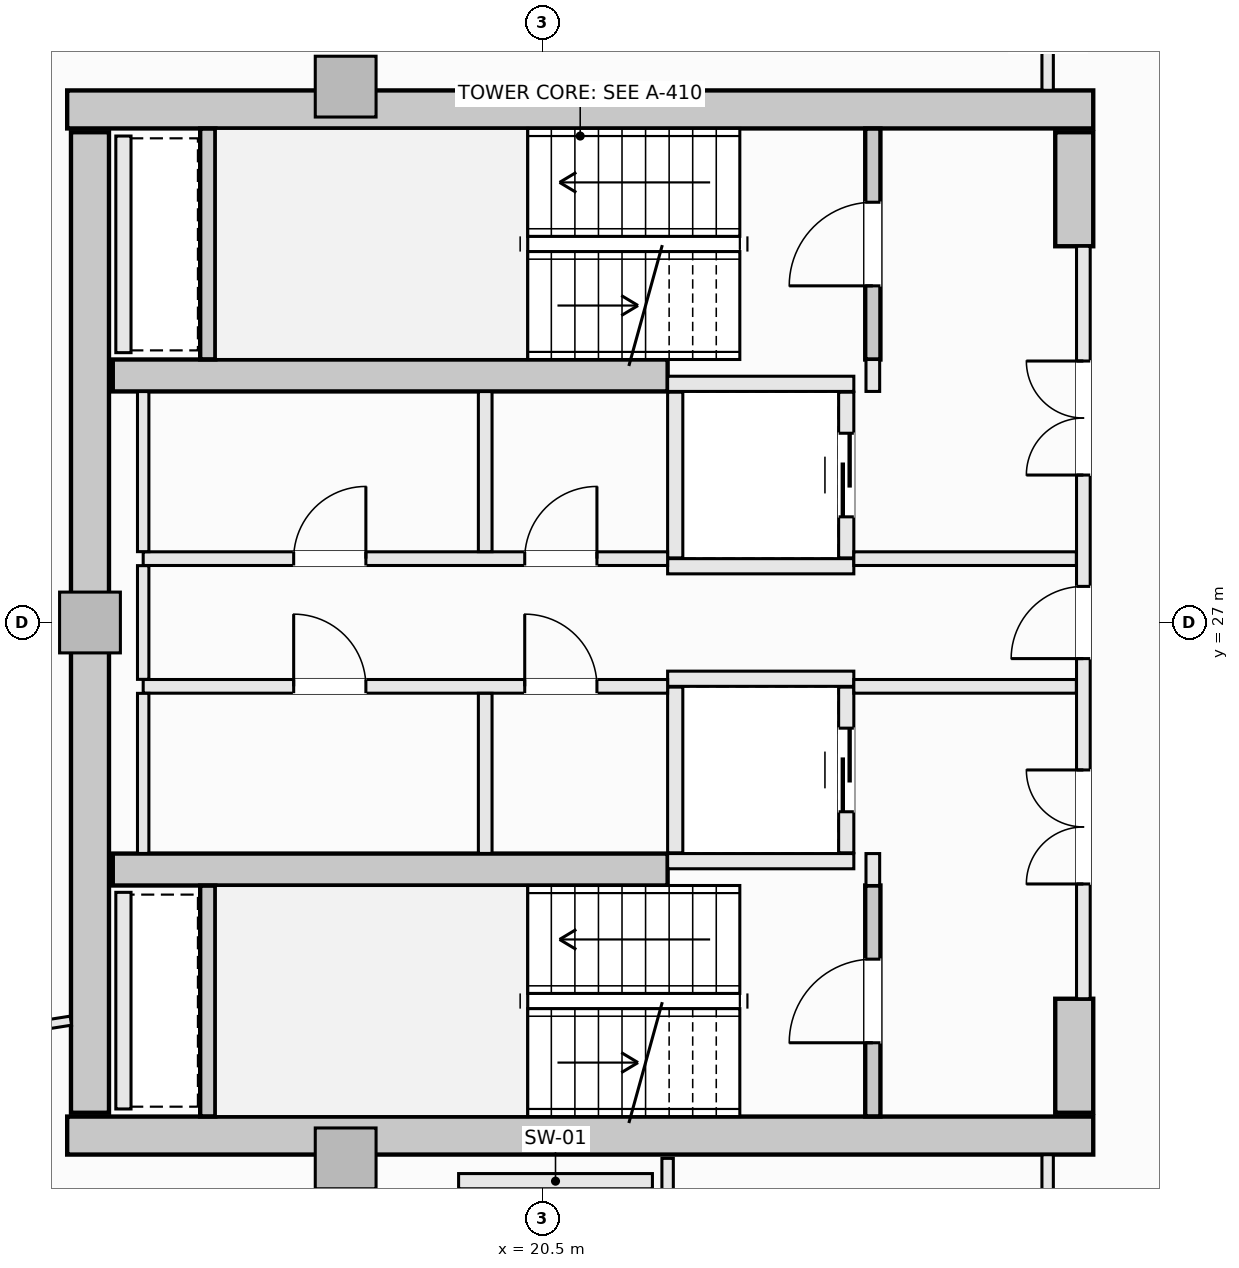
"""IFC4 building model, lengths in metres.
Left out: names, types, materials, properties, quantities, classifications, styles, units other than length and angle.
Written with IfcOpenShell. Run it as: python <this file> out.ifc"""

import sys

from ifc_helpers import new_model, si_unit, direction, frame, frame_2d, origin, origin_2d, place, context, subcontext, project, spatial, rectangle, extrude, element, fill, save


model = new_model("IFC4")
c1 = context("Model", 3, precision=1e-05, world=origin(), true_north=direction((0.0, 1.0)))
c2 = subcontext(c1, "Body", "Model", "MODEL_VIEW")
j1 = project(units=[si_unit("LENGTHUNIT", "METRE"), si_unit("PLANEANGLEUNIT", "RADIAN")], contexts=[c1])
p1 = place(None, origin())
s1 = spatial("IfcSite", under=j1, at=p1, CompositionType="ELEMENT")
p2 = place(p1, origin())
s2 = spatial("IfcBuilding", under=s1, at=p2, CompositionType="ELEMENT")
p3 = place(p2, frame((0.0, 0.0, 222.8)))
s3 = spatial("IfcBuildingStorey", under=s2, at=p3, CompositionType="ELEMENT", Elevation=222.8)
for number, where, z_axis, x_axis in (
    (1, (14.25, 33.75, -0.27), (0.0, 0.0, 1.0), (1.0, 0.0, 0.0)),
    (2, (14.25, 20.25, -0.27), (0.0, 0.0, 1.0), (1.0, 0.0, 0.0)),
):
    element("IfcWall", number, at=place(p3, frame(where, z_axis=z_axis, x_axis=x_axis)), inside=s3, PredefinedType="SHEAR", context=c2, shape_type="SweptSolid", body=[
        extrude(rectangle(XDim=13.5, YDim=0.5, at=frame_2d((6.75, 0.0))), origin(), (0.0, 0.0, 1.0), 3.3),
    ])
p4 = place(p3, frame((14.55, 20.55, -0.27), z_axis=(0.0, 0.0, 1.0), x_axis=(0.0, 1.0, 0.0)))
e3 = element("IfcWall", 3, at=p4, inside=s3, PredefinedType="SHEAR", context=c2, shape_type="SweptSolid", body=[
    extrude(rectangle(XDim=12.9, YDim=0.5, at=frame_2d((6.45, 0.0))), origin(), (0.0, 0.0, 1.0), 3.3),
])
for number, where, z_axis, x_axis in (
    (4, (27.5, 31.95, -0.27), (0.0, 0.0, 1.0), (0.0, 1.0, 0.0)),
    (5, (27.5, 20.55, -0.27), (0.0, 0.0, 1.0), (0.0, 1.0, 0.0)),
):
    element("IfcWall", number, at=place(p3, frame(where, z_axis=z_axis, x_axis=x_axis)), inside=s3, PredefinedType="SHEAR", context=c2, shape_type="SweptSolid", body=[
        extrude(rectangle(XDim=1.5, YDim=0.5, at=frame_2d((0.75, 0.0))), origin(), (0.0, 0.0, 1.0), 3.3),
    ])
for number, where, z_axis, x_axis in (
    (6, (14.85, 30.25, -0.27), (0.0, 0.0, 1.0), (1.0, 0.0, 0.0)),
    (7, (14.85, 23.75, -0.27), (0.0, 0.0, 1.0), (1.0, 0.0, 0.0)),
):
    element("IfcWall", number, at=place(p3, frame(where, z_axis=z_axis, x_axis=x_axis)), inside=s3, PredefinedType="SHEAR", context=c2, shape_type="SweptSolid", body=[
        extrude(rectangle(XDim=7.3, YDim=0.42, at=frame_2d((3.65, 0.0))), origin(), (0.0, 0.0, 1.0), 3.3),
    ])
for number, where, z_axis, x_axis in (
    (8, (17.914, 34.05, -0.27), (0.0, 0.0, 1.0), (1.0, 0.0, 0.0)),
    (9, (14.55, 27.0, -0.27), (0.0, 0.0, 1.0), (1.0, 0.0, 0.0)),
    (10, (17.914, 19.95, -0.27), (0.0, 0.0, 1.0), (1.0, 0.0, 0.0)),
):
    element("IfcColumn", number, at=place(p3, frame(where, z_axis=z_axis, x_axis=x_axis)), inside=s3, PredefinedType="PILASTER", context=c2, shape_type="SweptSolid", body=[
        extrude(rectangle(XDim=0.8, YDim=0.8, at=origin_2d()), origin(), (0.0, 0.0, 1.0), 3.3),
    ])
p5 = place(p3, frame((24.85, 30.46, -0.27), z_axis=(0.0, 0.0, 1.0), x_axis=(0.0, 1.0, 0.0)))
e11 = element("IfcWall", 11, at=p5, inside=s3, PredefinedType="SHEAR", context=c2, shape_type="SweptSolid", body=[
    extrude(rectangle(XDim=3.038, YDim=0.2, at=frame_2d((1.519, 0.0))), origin(), (0.0, 0.0, 1.0), 3.3),
])
p6 = place(p5, frame((0.969, 0.0, 0.27)))
e12 = element("IfcOpeningElement", 12, at=p6, cuts=e11, PredefinedType="OPENING", context=c2, shape_type="SweptSolid", body=[
    extrude(rectangle(XDim=1.1, YDim=2.15, at=frame_2d((0.55, 1.075))), frame((0.0, 0.11, 0.0), z_axis=(0.0, -1.0, 0.0), x_axis=(1.0, 0.0, 0.0)), (0.0, 0.0, 1.0), 0.22),
])
p7 = place(p3, frame((16.1, 30.462, -0.27), z_axis=(0.0, 0.0, 1.0), x_axis=(0.0, 1.0, 0.0)))
e13 = element("IfcWall", 13, at=p7, inside=s3, PredefinedType="SHEAR", context=c2, shape_type="SweptSolid", body=[
    extrude(rectangle(XDim=3.036, YDim=0.2, at=frame_2d((1.518, 0.0))), origin(), (0.0, 0.0, 1.0), 3.3),
])
p8 = place(p3, frame((24.85, 20.502, -0.27), z_axis=(0.0, 0.0, 1.0), x_axis=(0.0, 1.0, 0.0)))
e14 = element("IfcWall", 14, at=p8, inside=s3, PredefinedType="SHEAR", context=c2, shape_type="SweptSolid", body=[
    extrude(rectangle(XDim=3.038, YDim=0.2, at=frame_2d((1.519, 0.0))), origin(), (0.0, 0.0, 1.0), 3.3),
])
p9 = place(p8, frame((0.969, 0.0, 0.27)))
e15 = element("IfcOpeningElement", 15, at=p9, cuts=e14, PredefinedType="OPENING", context=c2, shape_type="SweptSolid", body=[
    extrude(rectangle(XDim=1.1, YDim=2.15, at=frame_2d((0.55, 1.075))), frame((0.0, 0.11, 0.0), z_axis=(0.0, -1.0, 0.0), x_axis=(1.0, 0.0, 0.0)), (0.0, 0.0, 1.0), 0.22),
])
p10 = place(p3, frame((16.1, 20.502, -0.27), z_axis=(0.0, 0.0, 1.0), x_axis=(0.0, 1.0, 0.0)))
e16 = element("IfcWall", 16, at=p10, inside=s3, PredefinedType="SHEAR", context=c2, shape_type="SweptSolid", body=[
    extrude(rectangle(XDim=3.036, YDim=0.2, at=frame_2d((1.518, 0.0))), origin(), (0.0, 0.0, 1.0), 3.3),
])
for number, where, z_axis, x_axis in (
    (17, (22.15, 30.14, 0.0), (0.0, 0.0, 1.0), (1.0, 0.0, 0.0)),
    (18, (22.15, 27.74, 0.0), (0.0, 0.0, 1.0), (1.0, 0.0, 0.0)),
):
    element("IfcWall", number, at=place(p3, frame(where, z_axis=z_axis, x_axis=x_axis)), inside=s3, PredefinedType="SOLIDWALL", context=c2, shape_type="SweptSolid", body=[
        extrude(rectangle(XDim=2.45, YDim=0.2, at=frame_2d((1.225, 0.0))), origin(), (0.0, 0.0, 1.0), 3.03),
    ])
p11 = place(p3, frame((22.25, 27.85, 0.0), z_axis=(0.0, 0.0, 1.0), x_axis=(0.0, 1.0, 0.0)))
e19 = element("IfcWall", 19, at=p11, inside=s3, PredefinedType="SOLIDWALL", context=c2, shape_type="SweptSolid", body=[
    extrude(rectangle(XDim=2.18, YDim=0.2, at=frame_2d((1.09, 0.0))), origin(), (0.0, 0.0, 1.0), 3.03),
])
p12 = place(p3, frame((24.5, 27.85, 0.0), z_axis=(0.0, 0.0, 1.0), x_axis=(0.0, 1.0, 0.0)))
e20 = element("IfcWall", 20, at=p12, inside=s3, PredefinedType="SOLIDWALL", context=c2, shape_type="SweptSolid", body=[
    extrude(rectangle(XDim=2.18, YDim=0.2, at=frame_2d((1.09, 0.0))), origin(), (0.0, 0.0, 1.0), 3.03),
])
p13 = place(p12, frame((0.54, 0.0, 0.0)))
e21 = element("IfcOpeningElement", 21, at=p13, cuts=e20, PredefinedType="OPENING", context=c2, shape_type="SweptSolid", body=[
    extrude(rectangle(XDim=1.1, YDim=2.2, at=frame_2d((0.55, 1.1))), frame((0.0, 0.11, 0.0), z_axis=(0.0, -1.0, 0.0), x_axis=(1.0, 0.0, 0.0)), (0.0, 0.0, 1.0), 0.22),
])
for number, where, z_axis, x_axis in (
    (22, (22.15, 26.26, 0.0), (0.0, 0.0, 1.0), (1.0, 0.0, 0.0)),
    (23, (22.15, 23.86, 0.0), (0.0, 0.0, 1.0), (1.0, 0.0, 0.0)),
):
    element("IfcWall", number, at=place(p3, frame(where, z_axis=z_axis, x_axis=x_axis)), inside=s3, PredefinedType="SOLIDWALL", context=c2, shape_type="SweptSolid", body=[
        extrude(rectangle(XDim=2.45, YDim=0.2, at=frame_2d((1.225, 0.0))), origin(), (0.0, 0.0, 1.0), 3.03),
    ])
p14 = place(p3, frame((22.25, 23.97, 0.0), z_axis=(0.0, 0.0, 1.0), x_axis=(0.0, 1.0, 0.0)))
e24 = element("IfcWall", 24, at=p14, inside=s3, PredefinedType="SOLIDWALL", context=c2, shape_type="SweptSolid", body=[
    extrude(rectangle(XDim=2.18, YDim=0.2, at=frame_2d((1.09, 0.0))), origin(), (0.0, 0.0, 1.0), 3.03),
])
p15 = place(p3, frame((24.5, 23.97, 0.0), z_axis=(0.0, 0.0, 1.0), x_axis=(0.0, 1.0, 0.0)))
e25 = element("IfcWall", 25, at=p15, inside=s3, PredefinedType="SOLIDWALL", context=c2, shape_type="SweptSolid", body=[
    extrude(rectangle(XDim=2.18, YDim=0.2, at=frame_2d((1.09, 0.0))), origin(), (0.0, 0.0, 1.0), 3.03),
])
p16 = place(p15, frame((0.54, 0.0, 0.0)))
e26 = element("IfcOpeningElement", 26, at=p16, cuts=e25, PredefinedType="OPENING", context=c2, shape_type="SweptSolid", body=[
    extrude(rectangle(XDim=1.1, YDim=2.2, at=frame_2d((0.55, 1.1))), frame((0.0, 0.11, 0.0), z_axis=(0.0, -1.0, 0.0), x_axis=(1.0, 0.0, 0.0)), (0.0, 0.0, 1.0), 0.22),
])
p17 = place(p3, frame((19.4, 19.65, 0.0), z_axis=(0.0, 0.0, 1.0), x_axis=(1.0, 0.0, 0.0)))
e27 = element("IfcWall", 27, at=p17, inside=s3, PredefinedType="SOLIDWALL", context=c2, shape_type="SweptSolid", body=[
    extrude(rectangle(XDim=2.55, YDim=0.2, at=frame_2d((1.275, 0.0))), origin(), (0.0, 0.0, 1.0), 3.03),
])
for number, where, z_axis, x_axis in (
    (28, (14.99, 30.55, 0.0), (0.0, 0.0, 1.0), (0.0, 1.0, 0.0)),
    (29, (14.99, 20.6, 0.0), (0.0, 0.0, 1.0), (0.0, 1.0, 0.0)),
):
    element("IfcWall", number, at=place(p3, frame(where, z_axis=z_axis, x_axis=x_axis)), inside=s3, PredefinedType="SOLIDWALL", context=c2, shape_type="SweptSolid", body=[
        extrude(rectangle(XDim=2.85, YDim=0.2, at=frame_2d((1.425, 0.0))), origin(), (0.0, 0.0, 1.0), 3.03),
    ])
for number, where, z_axis, x_axis in (
    (30, (24.85, 23.54, 0.0), (0.0, 0.0, 1.0), (0.0, 1.0, 0.0)),
    (31, (24.85, 30.04, 0.0), (0.0, 0.0, 1.0), (0.0, 1.0, 0.0)),
):
    element("IfcWall", number, at=place(p3, frame(where, z_axis=z_axis, x_axis=x_axis)), inside=s3, PredefinedType="SOLIDWALL", context=c2, shape_type="SweptSolid", body=[
        extrude(rectangle(XDim=0.42, YDim=0.18, at=frame_2d((0.21, 0.0))), origin(), (0.0, 0.0, 1.0), 3.03),
    ])
p18 = place(p3, frame((27.62, 22.05, 0.0), z_axis=(0.0, 0.0, 1.0), x_axis=(0.0, 1.0, 0.0)))
e32 = element("IfcWall", 32, at=p18, inside=s3, PredefinedType="SOLIDWALL", context=c2, shape_type="SweptSolid", body=[
    extrude(rectangle(XDim=9.9, YDim=0.18, at=frame_2d((4.95, 0.0))), origin(), (0.0, 0.0, 1.0), 3.03),
])
p19 = place(p18, frame((4.475, 0.0, 0.0)))
e33 = element("IfcOpeningElement", 33, at=p19, cuts=e32, PredefinedType="OPENING", context=c2, shape_type="SweptSolid", body=[
    extrude(rectangle(XDim=0.95, YDim=2.1, at=frame_2d((0.475, 1.05))), frame((0.0, 0.1, 0.0), z_axis=(0.0, -1.0, 0.0), x_axis=(1.0, 0.0, 0.0)), (0.0, 0.0, 1.0), 0.2),
])
p20 = place(p18, frame((6.89, 0.0, 0.0)))
e34 = element("IfcOpeningElement", 34, at=p20, cuts=e32, PredefinedType="OPENING", context=c2, shape_type="SweptSolid", body=[
    extrude(rectangle(XDim=1.5, YDim=2.2, at=frame_2d((0.75, 1.1))), frame((0.0, 0.1, 0.0), z_axis=(0.0, -1.0, 0.0), x_axis=(1.0, 0.0, 0.0)), (0.0, 0.0, 1.0), 0.2),
])
p21 = place(p18, frame((1.51, 0.0, 0.0)))
e35 = element("IfcOpeningElement", 35, at=p21, cuts=e32, PredefinedType="OPENING", context=c2, shape_type="SweptSolid", body=[
    extrude(rectangle(XDim=1.5, YDim=2.2, at=frame_2d((0.75, 1.1))), frame((0.0, 0.1, 0.0), z_axis=(0.0, -1.0, 0.0), x_axis=(1.0, 0.0, 0.0)), (0.0, 0.0, 1.0), 0.2),
])
p22 = place(p3, frame((15.25, 27.84, 0.0), z_axis=(0.0, 0.0, 1.0), x_axis=(1.0, 0.0, 0.0)))
e36 = element("IfcWall", 36, at=p22, inside=s3, PredefinedType="SOLIDWALL", context=c2, shape_type="SweptSolid", body=[
    extrude(rectangle(XDim=6.9, YDim=0.18, at=frame_2d((3.45, 0.0))), origin(), (0.0, 0.0, 1.0), 3.03),
])
p23 = place(p22, frame((5.02, 0.0, 0.0)))
e37 = element("IfcOpeningElement", 37, at=p23, cuts=e36, PredefinedType="OPENING", context=c2, shape_type="SweptSolid", body=[
    extrude(rectangle(XDim=0.95, YDim=2.1, at=frame_2d((0.475, 1.05))), frame((0.0, 0.1, 0.0), z_axis=(0.0, -1.0, 0.0), x_axis=(1.0, 0.0, 0.0)), (0.0, 0.0, 1.0), 0.2),
])
p24 = place(p22, frame((1.98, 0.0, 0.0)))
e38 = element("IfcOpeningElement", 38, at=p24, cuts=e36, PredefinedType="OPENING", context=c2, shape_type="SweptSolid", body=[
    extrude(rectangle(XDim=0.95, YDim=2.1, at=frame_2d((0.475, 1.05))), frame((0.0, 0.1, 0.0), z_axis=(0.0, -1.0, 0.0), x_axis=(1.0, 0.0, 0.0)), (0.0, 0.0, 1.0), 0.2),
])
p25 = place(p3, frame((24.6, 27.84, 0.0), z_axis=(0.0, 0.0, 1.0), x_axis=(1.0, 0.0, 0.0)))
e39 = element("IfcWall", 39, at=p25, inside=s3, PredefinedType="SOLIDWALL", context=c2, shape_type="SweptSolid", body=[
    extrude(rectangle(XDim=2.928, YDim=0.18, at=frame_2d((1.464, 0.0))), origin(), (0.0, 0.0, 1.0), 3.03),
])
p26 = place(p3, frame((15.25, 26.16, 0.0), z_axis=(0.0, 0.0, 1.0), x_axis=(1.0, 0.0, 0.0)))
e40 = element("IfcWall", 40, at=p26, inside=s3, PredefinedType="SOLIDWALL", context=c2, shape_type="SweptSolid", body=[
    extrude(rectangle(XDim=6.9, YDim=0.18, at=frame_2d((3.45, 0.0))), origin(), (0.0, 0.0, 1.0), 3.03),
])
p27 = place(p26, frame((5.02, 0.0, 0.0)))
e41 = element("IfcOpeningElement", 41, at=p27, cuts=e40, PredefinedType="OPENING", context=c2, shape_type="SweptSolid", body=[
    extrude(rectangle(XDim=0.95, YDim=2.1, at=frame_2d((0.475, 1.05))), frame((0.0, 0.1, 0.0), z_axis=(0.0, -1.0, 0.0), x_axis=(1.0, 0.0, 0.0)), (0.0, 0.0, 1.0), 0.2),
])
p28 = place(p26, frame((1.98, 0.0, 0.0)))
e42 = element("IfcOpeningElement", 42, at=p28, cuts=e40, PredefinedType="OPENING", context=c2, shape_type="SweptSolid", body=[
    extrude(rectangle(XDim=0.95, YDim=2.1, at=frame_2d((0.475, 1.05))), frame((0.0, 0.1, 0.0), z_axis=(0.0, -1.0, 0.0), x_axis=(1.0, 0.0, 0.0)), (0.0, 0.0, 1.0), 0.2),
])
p29 = place(p3, frame((24.6, 26.16, 0.0), z_axis=(0.0, 0.0, 1.0), x_axis=(1.0, 0.0, 0.0)))
e43 = element("IfcWall", 43, at=p29, inside=s3, PredefinedType="SOLIDWALL", context=c2, shape_type="SweptSolid", body=[
    extrude(rectangle(XDim=2.928, YDim=0.18, at=frame_2d((1.464, 0.0))), origin(), (0.0, 0.0, 1.0), 3.03),
])
p30 = place(p3, frame((15.25, 23.962, 0.0), z_axis=(0.0, 0.0, 1.0), x_axis=(0.0, 1.0, 0.0)))
e44 = element("IfcWall", 44, at=p30, inside=s3, PredefinedType="PARTITIONING", context=c2, shape_type="SweptSolid", body=[
    extrude(rectangle(XDim=2.106, YDim=0.15, at=frame_2d((1.053, 0.0))), origin(), (0.0, 0.0, 1.0), 3.03),
])
p31 = place(p3, frame((15.25, 26.252, 0.0), z_axis=(0.0, 0.0, 1.0), x_axis=(0.0, 1.0, 0.0)))
e45 = element("IfcWall", 45, at=p31, inside=s3, PredefinedType="PARTITIONING", context=c2, shape_type="SweptSolid", body=[
    extrude(rectangle(XDim=1.496, YDim=0.15, at=frame_2d((0.748, 0.0))), origin(), (0.0, 0.0, 1.0), 3.03),
])
p32 = place(p3, frame((15.25, 27.932, 0.0), z_axis=(0.0, 0.0, 1.0), x_axis=(0.0, 1.0, 0.0)))
e46 = element("IfcWall", 46, at=p32, inside=s3, PredefinedType="PARTITIONING", context=c2, shape_type="SweptSolid", body=[
    extrude(rectangle(XDim=2.106, YDim=0.15, at=frame_2d((1.053, 0.0))), origin(), (0.0, 0.0, 1.0), 3.03),
])
for number, where, z_axis, x_axis in (
    (47, (19.75, 23.962, 0.0), (0.0, 0.0, 1.0), (0.0, 1.0, 0.0)),
    (48, (19.75, 27.932, 0.0), (0.0, 0.0, 1.0), (0.0, 1.0, 0.0)),
):
    element("IfcWall", number, at=place(p3, frame(where, z_axis=z_axis, x_axis=x_axis)), inside=s3, PredefinedType="SOLIDWALL", context=c2, shape_type="SweptSolid", body=[
        extrude(rectangle(XDim=2.106, YDim=0.18, at=frame_2d((1.053, 0.0))), origin(), (0.0, 0.0, 1.0), 3.03),
    ])
p33 = place(p3, frame((22.15, 17.127, 0.0), z_axis=(0.0, 0.0, 1.0), x_axis=(0.0, 1.0, 0.0)))
e49 = element("IfcWall", 49, at=p33, inside=s3, PredefinedType="PARTITIONING", context=c2, shape_type="SweptSolid", body=[
    extrude(rectangle(XDim=2.823, YDim=0.15, at=frame_2d((1.412, 0.0))), origin(), (0.0, 0.0, 1.0), 3.03),
])
p34 = place(p3, frame((27.15, 17.127, 0.0), z_axis=(0.0, 0.0, 1.0), x_axis=(0.0, 1.0, 0.0)))
e50 = element("IfcWall", 50, at=p34, inside=s3, PredefinedType="PARTITIONING", context=c2, shape_type="SweptSolid", body=[
    extrude(rectangle(XDim=2.871, YDim=0.15, at=frame_2d((1.436, 0.0))), origin(), (0.0, 0.0, 1.0), 3.03),
])
p35 = place(p34, frame((0.96, 0.0, 0.0)))
e51 = element("IfcOpeningElement", 51, at=p35, cuts=e50, PredefinedType="OPENING", context=c2, shape_type="SweptSolid", body=[
    extrude(rectangle(XDim=0.95, YDim=2.1, at=frame_2d((0.475, 1.05))), frame((0.0, 0.085, 0.0), z_axis=(0.0, -1.0, 0.0), x_axis=(1.0, 0.0, 0.0)), (0.0, 0.0, 1.0), 0.17),
])
p36 = place(p3, frame((27.15, 34.002, 0.0), z_axis=(0.0, 0.0, 1.0), x_axis=(0.0, 1.0, 0.0)))
e52 = element("IfcWall", 52, at=p36, inside=s3, PredefinedType="PARTITIONING", context=c2, shape_type="SweptSolid", body=[
    extrude(rectangle(XDim=4.198, YDim=0.15, at=frame_2d((2.099, 0.0))), origin(), (0.0, 0.0, 1.0), 3.03),
])
p37 = place(p36, frame((1.998, 0.0, 0.0)))
e53 = element("IfcOpeningElement", 53, at=p37, cuts=e52, PredefinedType="OPENING", context=c2, shape_type="SweptSolid", body=[
    extrude(rectangle(XDim=0.95, YDim=2.1, at=frame_2d((0.475, 1.05))), frame((0.0, 0.085, 0.0), z_axis=(0.0, -1.0, 0.0), x_axis=(1.0, 0.0, 0.0)), (0.0, 0.0, 1.0), 0.17),
])
p38 = place(p3, frame((7.041, 20.617, 0.0), z_axis=(0.0, 0.0, 1.0), x_axis=(0.987780472541, 0.155851654036, 0.0)))
e54 = element("IfcWall", 54, at=p38, inside=s3, PredefinedType="PARTITIONING", context=c2, shape_type="SweptSolid", body=[
    extrude(rectangle(XDim=7.347, YDim=0.12, at=frame_2d((3.673, 0.0))), origin(), (0.0, 0.0, 1.0), 3.03),
])
p39 = place(p6, origin())
e55 = element("IfcDoor", 55, at=p39, inside=s3, OperationType="SINGLE_SWING_LEFT", PredefinedType="DOOR", context=c2, shape_type="SweptSolid", body=[
    extrude(rectangle(XDim=1.1, YDim=2.15, at=frame_2d((0.55, 1.075))), frame((0.0, 0.025, 0.0), z_axis=(0.0, -1.0, 0.0), x_axis=(1.0, 0.0, 0.0)), (0.0, 0.0, 1.0), 0.05),
])
fill(e12, e55)
p40 = place(p9, origin())
e56 = element("IfcDoor", 56, at=p40, inside=s3, OperationType="SINGLE_SWING_LEFT", PredefinedType="DOOR", context=c2, shape_type="SweptSolid", body=[
    extrude(rectangle(XDim=1.1, YDim=2.15, at=frame_2d((0.55, 1.075))), frame((0.0, 0.025, 0.0), z_axis=(0.0, -1.0, 0.0), x_axis=(1.0, 0.0, 0.0)), (0.0, 0.0, 1.0), 0.05),
])
fill(e15, e56)
p41 = place(p13, origin())
e57 = element("IfcDoor", 57, at=p41, inside=s3, OperationType="SLIDING_TO_LEFT", PredefinedType="DOOR", context=c2, shape_type="SweptSolid", body=[
    extrude(rectangle(XDim=1.1, YDim=2.2, at=frame_2d((0.55, 1.1))), frame((0.0, 0.025, 0.0), z_axis=(0.0, -1.0, 0.0), x_axis=(1.0, 0.0, 0.0)), (0.0, 0.0, 1.0), 0.05),
])
fill(e21, e57)
p42 = place(p16, origin())
e58 = element("IfcDoor", 58, at=p42, inside=s3, OperationType="SLIDING_TO_LEFT", PredefinedType="DOOR", context=c2, shape_type="SweptSolid", body=[
    extrude(rectangle(XDim=1.1, YDim=2.2, at=frame_2d((0.55, 1.1))), frame((0.0, 0.025, 0.0), z_axis=(0.0, -1.0, 0.0), x_axis=(1.0, 0.0, 0.0)), (0.0, 0.0, 1.0), 0.05),
])
fill(e26, e58)
p43 = place(p19, origin())
e59 = element("IfcDoor", 59, at=p43, inside=s3, OperationType="SINGLE_SWING_LEFT", PredefinedType="DOOR", context=c2, shape_type="SweptSolid", body=[
    extrude(rectangle(XDim=0.95, YDim=2.1, at=frame_2d((0.475, 1.05))), frame((0.0, 0.025, 0.0), z_axis=(0.0, -1.0, 0.0), x_axis=(1.0, 0.0, 0.0)), (0.0, 0.0, 1.0), 0.05),
])
fill(e33, e59)
p44 = place(p20, origin())
e60 = element("IfcDoor", 60, at=p44, inside=s3, OperationType="DOUBLE_DOOR_SINGLE_SWING", PredefinedType="DOOR", context=c2, shape_type="SweptSolid", body=[
    extrude(rectangle(XDim=1.5, YDim=2.2, at=frame_2d((0.75, 1.1))), frame((0.0, 0.025, 0.0), z_axis=(0.0, -1.0, 0.0), x_axis=(1.0, 0.0, 0.0)), (0.0, 0.0, 1.0), 0.05),
])
fill(e34, e60)
p45 = place(p21, origin())
e61 = element("IfcDoor", 61, at=p45, inside=s3, OperationType="DOUBLE_DOOR_SINGLE_SWING", PredefinedType="DOOR", context=c2, shape_type="SweptSolid", body=[
    extrude(rectangle(XDim=1.5, YDim=2.2, at=frame_2d((0.75, 1.1))), frame((0.0, 0.025, 0.0), z_axis=(0.0, -1.0, 0.0), x_axis=(1.0, 0.0, 0.0)), (0.0, 0.0, 1.0), 0.05),
])
fill(e35, e61)
p46 = place(p23, origin())
e62 = element("IfcDoor", 62, at=p46, inside=s3, OperationType="SINGLE_SWING_RIGHT", PredefinedType="DOOR", context=c2, shape_type="SweptSolid", body=[
    extrude(rectangle(XDim=0.95, YDim=2.1, at=frame_2d((0.475, 1.05))), frame((0.0, 0.025, 0.0), z_axis=(0.0, -1.0, 0.0), x_axis=(1.0, 0.0, 0.0)), (0.0, 0.0, 1.0), 0.05),
])
fill(e37, e62)
p47 = place(p27, origin())
e63 = element("IfcDoor", 63, at=p47, inside=s3, OperationType="SINGLE_SWING_LEFT", PredefinedType="DOOR", context=c2, shape_type="SweptSolid", body=[
    extrude(rectangle(XDim=0.95, YDim=2.1, at=frame_2d((0.475, 1.05))), frame((0.0, 0.025, 0.0), z_axis=(0.0, -1.0, 0.0), x_axis=(1.0, 0.0, 0.0)), (0.0, 0.0, 1.0), 0.05),
])
fill(e41, e63)
p48 = place(p24, origin())
e64 = element("IfcDoor", 64, at=p48, inside=s3, OperationType="SINGLE_SWING_RIGHT", PredefinedType="DOOR", context=c2, shape_type="SweptSolid", body=[
    extrude(rectangle(XDim=0.95, YDim=2.1, at=frame_2d((0.475, 1.05))), frame((0.0, 0.025, 0.0), z_axis=(0.0, -1.0, 0.0), x_axis=(1.0, 0.0, 0.0)), (0.0, 0.0, 1.0), 0.05),
])
fill(e38, e64)
p49 = place(p28, origin())
e65 = element("IfcDoor", 65, at=p49, inside=s3, OperationType="SINGLE_SWING_LEFT", PredefinedType="DOOR", context=c2, shape_type="SweptSolid", body=[
    extrude(rectangle(XDim=0.95, YDim=2.1, at=frame_2d((0.475, 1.05))), frame((0.0, 0.025, 0.0), z_axis=(0.0, -1.0, 0.0), x_axis=(1.0, 0.0, 0.0)), (0.0, 0.0, 1.0), 0.05),
])
fill(e42, e65)
save(model, sys.argv[1])
